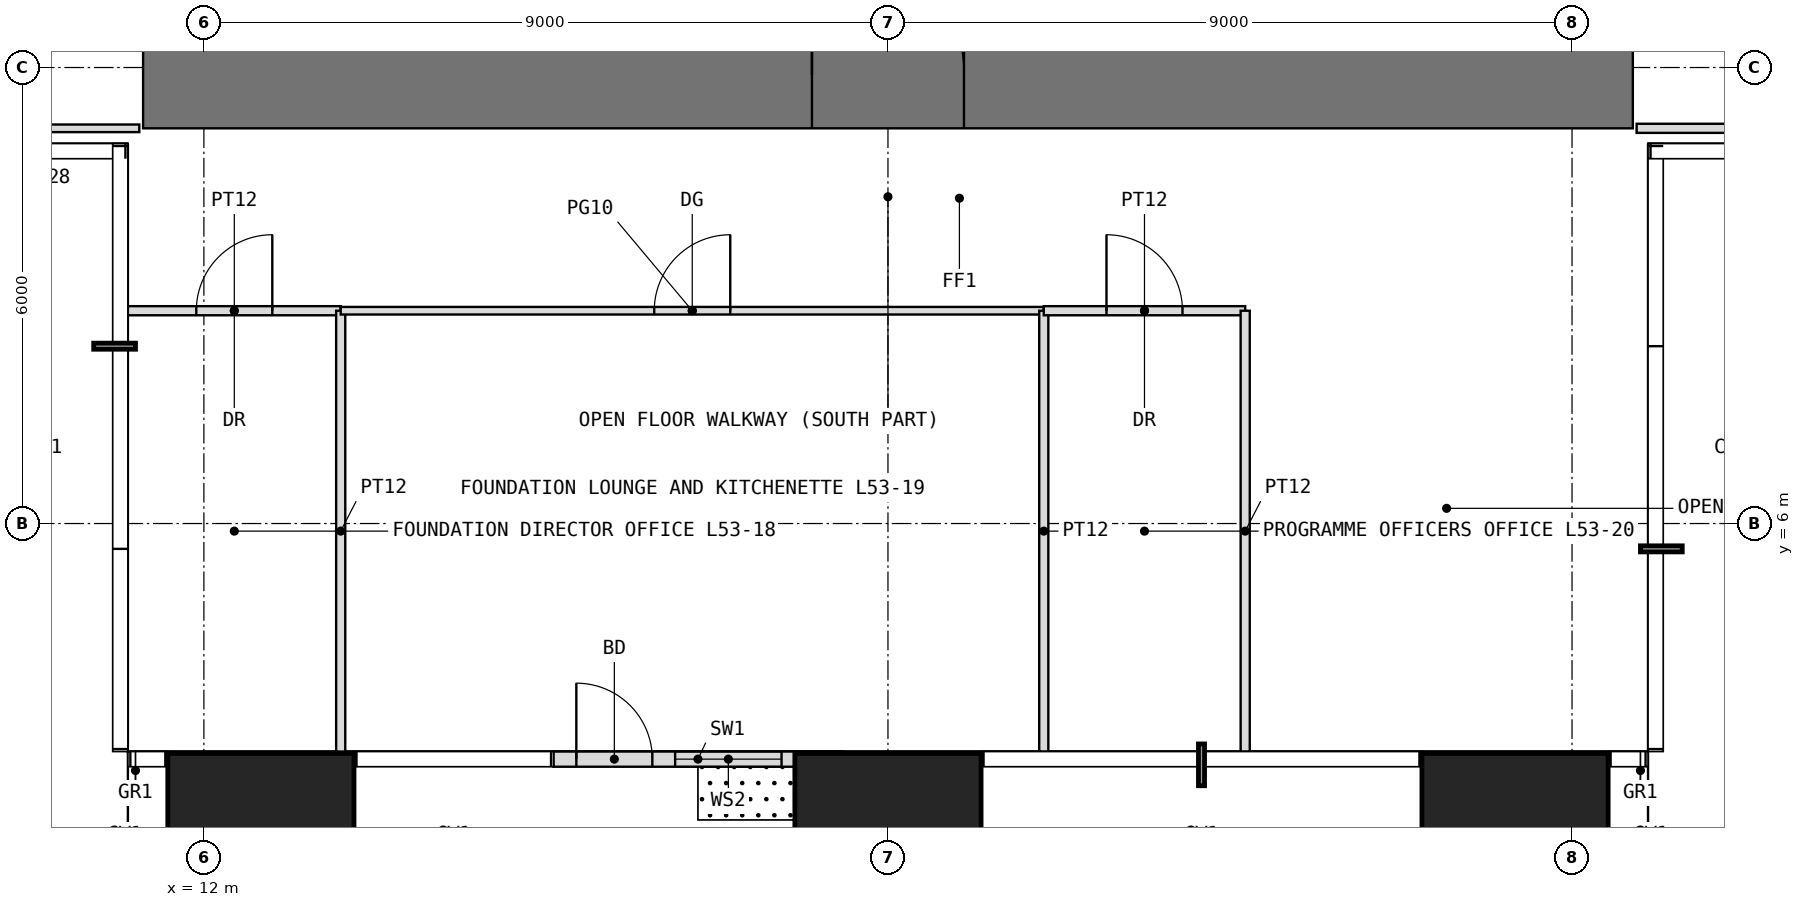
"""IFC4 building model, lengths in metres.
Left out: names, types, materials, properties, quantities, classifications, styles, units other than length and angle.
Written with IfcOpenShell. Run it as: python <this file> out.ifc"""

import sys

from ifc_helpers import new_model, si_unit, direction, frame, frame_2d, origin, origin_2d, place, context, subcontext, project, spatial, rectangle, extrude, element, fill, save


model = new_model("IFC4")
c1 = context("Model", 3, precision=1e-05, world=origin(), true_north=direction((0.0, 1.0)))
c2 = subcontext(c1, "Body", "Model", "MODEL_VIEW")
j1 = project(units=[si_unit("LENGTHUNIT", "METRE"), si_unit("PLANEANGLEUNIT", "RADIAN")], contexts=[c1])
p1 = place(None, origin())
s1 = spatial("IfcSite", under=j1, at=p1, CompositionType="ELEMENT")
p2 = place(p1, origin())
s2 = spatial("IfcBuilding", under=s1, at=p2, CompositionType="ELEMENT")
p3 = place(p2, frame((0.0, 0.0, 222.5)))
s3 = spatial("IfcBuildingStorey", under=s2, at=p3, CompositionType="ELEMENT", Elevation=222.5)
for number, where, z_axis, x_axis in (
    (1, (12.75, 1.75, 0.0), (0.0, 0.0, 1.0), (1.0, 0.0, 0.0)),
    (2, (21.0, 1.75, 0.0), (0.0, 0.0, 1.0), (1.0, 0.0, 0.0)),
    (3, (29.25, 1.75, 0.0), (0.0, 0.0, 1.0), (1.0, 0.0, 0.0)),
):
    element("IfcColumn", number, at=place(p3, frame(where, z_axis=z_axis, x_axis=x_axis)), inside=s3, PredefinedType="COLUMN", context=c2, shape_type="SweptSolid", body=[
        extrude(rectangle(XDim=2.45, YDim=2.45, at=origin_2d()), origin(), (0.0, 0.0, 1.0), 4.0),
    ])
p4 = place(p3, frame((16.6, 2.9, 0.0), z_axis=(0.0, 0.0, 1.0), x_axis=(1.0, 0.0, 0.0)))
e4 = element("IfcWall", 4, at=p4, inside=s3, PredefinedType="USERDEFINED", context=c2, shape_type="SweptSolid", body=[
    extrude(rectangle(XDim=3.8, YDim=0.2, at=frame_2d((1.9, 0.0))), origin(), (0.0, 0.0, 1.0), 3.75),
])
p5 = place(p4, frame((0.3, 0.0, 0.0)))
e5 = element("IfcOpeningElement", 5, at=p5, cuts=e4, PredefinedType="OPENING", context=c2, shape_type="SweptSolid", body=[
    extrude(rectangle(XDim=1.0, YDim=2.4, at=frame_2d((0.5, 1.2))), frame((0.0, 0.11, 0.0), z_axis=(0.0, -1.0, 0.0), x_axis=(1.0, 0.0, 0.0)), (0.0, 0.0, 1.0), 0.22),
])
p6 = place(p4, frame((1.6, 0.0, 0.3)))
e6 = element("IfcOpeningElement", 6, at=p6, cuts=e4, PredefinedType="OPENING", context=c2, shape_type="SweptSolid", body=[
    extrude(rectangle(XDim=1.4, YDim=2.7, at=frame_2d((0.7, 1.35))), frame((0.0, 0.11, 0.0), z_axis=(0.0, -1.0, 0.0), x_axis=(1.0, 0.0, 0.0)), (0.0, 0.0, 1.0), 0.22),
])
p7 = place(p3, frame((11.2, 11.9, -0.05), z_axis=(0.0, 0.0, 1.0), x_axis=(1.0, 0.0, 0.0)))
e7 = element("IfcWall", 7, at=p7, inside=s3, PredefinedType="SHEAR", context=c2, shape_type="SweptSolid", body=[
    extrude(rectangle(XDim=19.6, YDim=1.4, at=frame_2d((9.8, 0.0))), origin(), (0.0, 0.0, 1.0), 4.0),
])
p8 = place(p7, frame((8.8, 0.0, 0.05)))
e8 = element("IfcOpeningElement", 8, at=p8, cuts=e7, PredefinedType="OPENING", context=c2, shape_type="SweptSolid", body=[
    extrude(rectangle(XDim=2.0, YDim=2.2, at=frame_2d((1.0, 1.1))), frame((0.0, 0.71, 0.0), z_axis=(0.0, -1.0, 0.0), x_axis=(1.0, 0.0, 0.0)), (0.0, 0.0, 1.0), 1.42),
])
p9 = place(p3, frame((7.6, 11.2, 0.0), z_axis=(0.0, 0.0, 1.0), x_axis=(1.0, 0.0, 0.0)))
e9 = element("IfcWall", 9, at=p9, inside=s3, PredefinedType="PARTITIONING", context=c2, shape_type="SweptSolid", body=[
    extrude(rectangle(XDim=3.55, YDim=0.1, at=frame_2d((1.775, 0.0))), origin(), (0.0, 0.0, 1.0), 3.75),
])
p10 = place(p3, frame((11.0, 8.8, 0.0), z_axis=(0.0, 0.0, 1.0), x_axis=(1.0, 0.0, 0.0)))
e10 = element("IfcWall", 10, at=p10, inside=s3, PredefinedType="PARTITIONING", context=c2, shape_type="SweptSolid", body=[
    extrude(rectangle(XDim=2.8, YDim=0.12, at=frame_2d((1.4, 0.0))), origin(), (0.0, 0.0, 1.0), 3.75),
])
p11 = place(p10, frame((0.9, 0.0, 0.0)))
e11 = element("IfcOpeningElement", 11, at=p11, cuts=e10, PredefinedType="OPENING", context=c2, shape_type="SweptSolid", body=[
    extrude(rectangle(XDim=1.0, YDim=2.2, at=frame_2d((0.5, 1.1))), frame((0.0, 0.07, 0.0), z_axis=(0.0, -1.0, 0.0), x_axis=(1.0, 0.0, 0.0)), (0.0, 0.0, 1.0), 0.14),
])
p12 = place(p3, frame((13.8, 3.0, 0.0), z_axis=(0.0, 0.0, 1.0), x_axis=(0.0, 1.0, 0.0)))
e12 = element("IfcWall", 12, at=p12, inside=s3, PredefinedType="PARTITIONING", context=c2, shape_type="SweptSolid", body=[
    extrude(rectangle(XDim=5.8, YDim=0.12, at=frame_2d((2.9, 0.0))), origin(), (0.0, 0.0, 1.0), 3.75),
])
p13 = place(p3, frame((13.8, 8.8, 0.0), z_axis=(0.0, 0.0, 1.0), x_axis=(1.0, 0.0, 0.0)))
e13 = element("IfcWall", 13, at=p13, inside=s3, PredefinedType="PARTITIONING", context=c2, shape_type="SweptSolid", body=[
    extrude(rectangle(XDim=9.25, YDim=0.1, at=frame_2d((4.625, 0.0))), origin(), (0.0, 0.0, 1.0), 3.75),
])
p14 = place(p13, frame((4.125, 0.0, 0.0)))
e14 = element("IfcOpeningElement", 14, at=p14, cuts=e13, PredefinedType="OPENING", context=c2, shape_type="SweptSolid", body=[
    extrude(rectangle(XDim=1.0, YDim=2.4, at=frame_2d((0.5, 1.2))), frame((0.0, 0.06, 0.0), z_axis=(0.0, -1.0, 0.0), x_axis=(1.0, 0.0, 0.0)), (0.0, 0.0, 1.0), 0.12),
])
p15 = place(p3, frame((23.05, 3.0, 0.0), z_axis=(0.0, 0.0, 1.0), x_axis=(0.0, 1.0, 0.0)))
e15 = element("IfcWall", 15, at=p15, inside=s3, PredefinedType="PARTITIONING", context=c2, shape_type="SweptSolid", body=[
    extrude(rectangle(XDim=5.8, YDim=0.12, at=frame_2d((2.9, 0.0))), origin(), (0.0, 0.0, 1.0), 3.75),
])
p16 = place(p3, frame((23.05, 8.8, 0.0), z_axis=(0.0, 0.0, 1.0), x_axis=(1.0, 0.0, 0.0)))
e16 = element("IfcWall", 16, at=p16, inside=s3, PredefinedType="PARTITIONING", context=c2, shape_type="SweptSolid", body=[
    extrude(rectangle(XDim=2.65, YDim=0.12, at=frame_2d((1.325, 0.0))), origin(), (0.0, 0.0, 1.0), 3.75),
])
p17 = place(p16, frame((0.825, 0.0, 0.0)))
e17 = element("IfcOpeningElement", 17, at=p17, cuts=e16, PredefinedType="OPENING", context=c2, shape_type="SweptSolid", body=[
    extrude(rectangle(XDim=1.0, YDim=2.2, at=frame_2d((0.5, 1.1))), frame((0.0, 0.07, 0.0), z_axis=(0.0, -1.0, 0.0), x_axis=(1.0, 0.0, 0.0)), (0.0, 0.0, 1.0), 0.14),
])
p18 = place(p3, frame((25.7, 3.0, 0.0), z_axis=(0.0, 0.0, 1.0), x_axis=(0.0, 1.0, 0.0)))
e18 = element("IfcWall", 18, at=p18, inside=s3, PredefinedType="PARTITIONING", context=c2, shape_type="SweptSolid", body=[
    extrude(rectangle(XDim=5.8, YDim=0.12, at=frame_2d((2.9, 0.0))), origin(), (0.0, 0.0, 1.0), 3.75),
])
p19 = place(p3, frame((30.85, 11.2, 0.0), z_axis=(0.0, 0.0, 1.0), x_axis=(1.0, 0.0, 0.0)))
e19 = element("IfcWall", 19, at=p19, inside=s3, PredefinedType="PARTITIONING", context=c2, shape_type="SweptSolid", body=[
    extrude(rectangle(XDim=4.45, YDim=0.12, at=frame_2d((2.225, 0.0))), origin(), (0.0, 0.0, 1.0), 3.75),
])
p20 = place(p5, origin())
e20 = element("IfcDoor", 20, at=p20, inside=s3, OperationType="SINGLE_SWING_LEFT", PredefinedType="DOOR", context=c2, shape_type="SweptSolid", body=[
    extrude(rectangle(XDim=1.0, YDim=2.4, at=frame_2d((0.5, 1.2))), frame((0.0, 0.025, 0.0), z_axis=(0.0, -1.0, 0.0), x_axis=(1.0, 0.0, 0.0)), (0.0, 0.0, 1.0), 0.05),
])
fill(e5, e20)
p21 = place(p6, origin())
e21 = element("IfcWindow", 21, at=p21, inside=s3, PartitioningType="SINGLE_PANEL", PredefinedType="WINDOW", context=c2, shape_type="SweptSolid", body=[
    extrude(rectangle(XDim=1.4, YDim=2.7, at=frame_2d((0.7, 1.35))), frame((0.0, 0.03, 0.0), z_axis=(0.0, -1.0, 0.0), x_axis=(1.0, 0.0, 0.0)), (0.0, 0.0, 1.0), 0.06),
])
fill(e6, e21)
p22 = place(p8, origin())
e22 = element("IfcDoor", 22, at=p22, inside=s3, OperationType="DOUBLE_DOOR_SINGLE_SWING", PredefinedType="DOOR", context=c2, shape_type="SweptSolid", body=[
    extrude(rectangle(XDim=2.0, YDim=2.2, at=frame_2d((1.0, 1.1))), frame((0.0, 0.025, 0.0), z_axis=(0.0, -1.0, 0.0), x_axis=(1.0, 0.0, 0.0)), (0.0, 0.0, 1.0), 0.05),
])
fill(e8, e22)
p23 = place(p11, origin())
e23 = element("IfcDoor", 23, at=p23, inside=s3, OperationType="SINGLE_SWING_RIGHT", PredefinedType="DOOR", context=c2, shape_type="SweptSolid", body=[
    extrude(rectangle(XDim=1.0, YDim=2.2, at=frame_2d((0.5, 1.1))), frame((0.0, 0.025, 0.0), z_axis=(0.0, -1.0, 0.0), x_axis=(1.0, 0.0, 0.0)), (0.0, 0.0, 1.0), 0.05),
])
fill(e11, e23)
p24 = place(p14, origin())
e24 = element("IfcDoor", 24, at=p24, inside=s3, OperationType="SINGLE_SWING_RIGHT", PredefinedType="DOOR", context=c2, shape_type="SweptSolid", body=[
    extrude(rectangle(XDim=1.0, YDim=2.4, at=frame_2d((0.5, 1.2))), frame((0.0, 0.025, 0.0), z_axis=(0.0, -1.0, 0.0), x_axis=(1.0, 0.0, 0.0)), (0.0, 0.0, 1.0), 0.05),
])
fill(e14, e24)
p25 = place(p17, origin())
e25 = element("IfcDoor", 25, at=p25, inside=s3, OperationType="SINGLE_SWING_LEFT", PredefinedType="DOOR", context=c2, shape_type="SweptSolid", body=[
    extrude(rectangle(XDim=1.0, YDim=2.2, at=frame_2d((0.5, 1.1))), frame((0.0, 0.025, 0.0), z_axis=(0.0, -1.0, 0.0), x_axis=(1.0, 0.0, 0.0)), (0.0, 0.0, 1.0), 0.05),
])
fill(e17, e25)
save(model, sys.argv[1])
